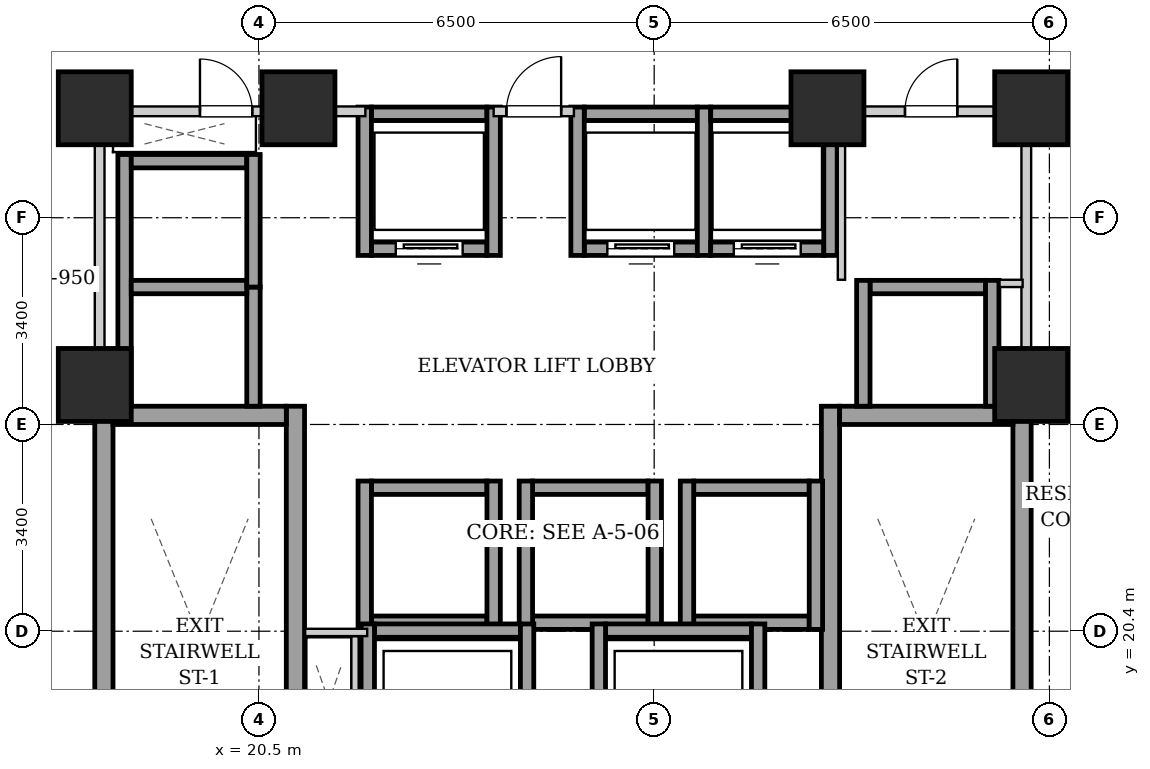
"""IFC4 building model, lengths in metres.
Left out: names, types, materials, properties, quantities, classifications, styles, units other than length and angle.
Written with IfcOpenShell. Run it as: python <this file> out.ifc"""

import sys

from ifc_helpers import new_model, si_unit, direction, frame, frame_2d, origin, origin_2d, place, context, subcontext, project, spatial, rectangle, extrude, element, fill, save


model = new_model("IFC4")
c1 = context("Model", 3, precision=1e-05, world=origin(), true_north=direction((0.0, 1.0)))
c2 = subcontext(c1, "Body", "Model", "MODEL_VIEW")
j1 = project(units=[si_unit("LENGTHUNIT", "METRE"), si_unit("PLANEANGLEUNIT", "RADIAN")], contexts=[c1])
p1 = place(None, origin())
s1 = spatial("IfcSite", under=j1, at=p1, CompositionType="ELEMENT")
p2 = place(p1, origin())
s2 = spatial("IfcBuilding", under=s1, at=p2, CompositionType="ELEMENT")
p3 = place(p2, frame((0.0, 0.0, 45.0)))
s3 = spatial("IfcBuildingStorey", under=s2, at=p3, CompositionType="ELEMENT", Elevation=45.0)
for number, where, z_axis, x_axis in (
    (1, (17.8, 29.0, 0.0), (0.0, 0.0, 1.0), (1.0, 0.0, 0.0)),
    (2, (21.15, 29.0, 0.0), (0.0, 0.0, 1.0), (1.0, 0.0, 0.0)),
    (3, (29.85, 29.0, 0.0), (0.0, 0.0, 1.0), (1.0, 0.0, 0.0)),
    (4, (33.2, 29.0, 0.0), (0.0, 0.0, 1.0), (1.0, 0.0, 0.0)),
    (5, (17.8, 24.45, 0.0), (0.0, 0.0, 1.0), (1.0, 0.0, 0.0)),
    (6, (33.2, 24.45, 0.0), (0.0, 0.0, 1.0), (1.0, 0.0, 0.0)),
):
    element("IfcColumn", number, at=place(p3, frame(where, z_axis=z_axis, x_axis=x_axis)), inside=s3, PredefinedType="COLUMN", context=c2, shape_type="SweptSolid", body=[
        extrude(rectangle(XDim=1.2, YDim=1.2, at=origin_2d()), origin(), (0.0, 0.0, 1.0), 3.2),
    ])
for number, where, z_axis, x_axis in (
    (7, (17.95, 15.1, 0.0), (0.0, 0.0, 1.0), (0.0, 1.0, 0.0)),
    (8, (21.1, 15.1, 0.0), (0.0, 0.0, 1.0), (0.0, 1.0, 0.0)),
):
    element("IfcWall", number, at=place(p3, frame(where, z_axis=z_axis, x_axis=x_axis)), inside=s3, PredefinedType="SHEAR", context=c2, shape_type="SweptSolid", body=[
        extrude(rectangle(XDim=9.0, YDim=0.3, at=frame_2d((4.5, 0.0))), origin(), (0.0, 0.0, 1.0), 2.94),
    ])
p4 = place(p3, frame((18.1, 23.95, 0.0), z_axis=(0.0, 0.0, 1.0), x_axis=(1.0, 0.0, 0.0)))
e9 = element("IfcWall", 9, at=p4, inside=s3, PredefinedType="SHEAR", context=c2, shape_type="SweptSolid", body=[
    extrude(rectangle(XDim=2.85, YDim=0.3, at=frame_2d((1.425, 0.0))), origin(), (0.0, 0.0, 1.0), 2.94),
])
for number, where, z_axis, x_axis in (
    (10, (29.9, 15.1, 0.0), (0.0, 0.0, 1.0), (0.0, 1.0, 0.0)),
    (11, (33.05, 15.1, 0.0), (0.0, 0.0, 1.0), (0.0, 1.0, 0.0)),
):
    element("IfcWall", number, at=place(p3, frame(where, z_axis=z_axis, x_axis=x_axis)), inside=s3, PredefinedType="SHEAR", context=c2, shape_type="SweptSolid", body=[
        extrude(rectangle(XDim=9.0, YDim=0.3, at=frame_2d((4.5, 0.0))), origin(), (0.0, 0.0, 1.0), 2.94),
    ])
p5 = place(p3, frame((30.05, 23.95, 0.0), z_axis=(0.0, 0.0, 1.0), x_axis=(1.0, 0.0, 0.0)))
e12 = element("IfcWall", 12, at=p5, inside=s3, PredefinedType="SHEAR", context=c2, shape_type="SweptSolid", body=[
    extrude(rectangle(XDim=2.85, YDim=0.3, at=frame_2d((1.425, 0.0))), origin(), (0.0, 0.0, 1.0), 2.94),
])
p6 = place(p3, frame((22.35, 26.69, 0.0), z_axis=(0.0, 0.0, 1.0), x_axis=(1.0, 0.0, 0.0)))
e13 = element("IfcWall", 13, at=p6, inside=s3, PredefinedType="SHEAR", context=c2, shape_type="SweptSolid", body=[
    extrude(rectangle(XDim=1.9, YDim=0.22, at=frame_2d((0.95, 0.0))), origin(), (0.0, 0.0, 1.0), 2.94),
])
p7 = place(p6, frame((0.4, 0.0, 0.0)))
e14 = element("IfcOpeningElement", 14, at=p7, cuts=e13, PredefinedType="OPENING", context=c2, shape_type="SweptSolid", body=[
    extrude(rectangle(XDim=1.1, YDim=2.15, at=frame_2d((0.55, 1.075))), frame((0.0, 0.12, 0.0), z_axis=(0.0, -1.0, 0.0), x_axis=(1.0, 0.0, 0.0)), (0.0, 0.0, 1.0), 0.24),
])
p8 = place(p3, frame((22.35, 28.91, 0.0), z_axis=(0.0, 0.0, 1.0), x_axis=(1.0, 0.0, 0.0)))
e15 = element("IfcWall", 15, at=p8, inside=s3, PredefinedType="SHEAR", context=c2, shape_type="SweptSolid", body=[
    extrude(rectangle(XDim=1.9, YDim=0.22, at=frame_2d((0.95, 0.0))), origin(), (0.0, 0.0, 1.0), 2.94),
])
for number, where, z_axis, x_axis in (
    (16, (22.24, 26.58, 0.0), (0.0, 0.0, 1.0), (0.0, 1.0, 0.0)),
    (17, (24.36, 26.58, 0.0), (0.0, 0.0, 1.0), (0.0, 1.0, 0.0)),
):
    element("IfcWall", number, at=place(p3, frame(where, z_axis=z_axis, x_axis=x_axis)), inside=s3, PredefinedType="SHEAR", context=c2, shape_type="SweptSolid", body=[
        extrude(rectangle(XDim=2.44, YDim=0.22, at=frame_2d((1.22, 0.0))), origin(), (0.0, 0.0, 1.0), 2.94),
    ])
p9 = place(p3, frame((25.85, 26.69, 0.0), z_axis=(0.0, 0.0, 1.0), x_axis=(1.0, 0.0, 0.0)))
e18 = element("IfcWall", 18, at=p9, inside=s3, PredefinedType="SHEAR", context=c2, shape_type="SweptSolid", body=[
    extrude(rectangle(XDim=1.86, YDim=0.22, at=frame_2d((0.93, 0.0))), origin(), (0.0, 0.0, 1.0), 2.94),
])
p10 = place(p9, frame((0.38, 0.0, 0.0)))
e19 = element("IfcOpeningElement", 19, at=p10, cuts=e18, PredefinedType="OPENING", context=c2, shape_type="SweptSolid", body=[
    extrude(rectangle(XDim=1.1, YDim=2.15, at=frame_2d((0.55, 1.075))), frame((0.0, 0.12, 0.0), z_axis=(0.0, -1.0, 0.0), x_axis=(1.0, 0.0, 0.0)), (0.0, 0.0, 1.0), 0.24),
])
p11 = place(p3, frame((25.85, 28.91, 0.0), z_axis=(0.0, 0.0, 1.0), x_axis=(1.0, 0.0, 0.0)))
e20 = element("IfcWall", 20, at=p11, inside=s3, PredefinedType="SHEAR", context=c2, shape_type="SweptSolid", body=[
    extrude(rectangle(XDim=1.86, YDim=0.22, at=frame_2d((0.93, 0.0))), origin(), (0.0, 0.0, 1.0), 2.94),
])
for number, where, z_axis, x_axis in (
    (21, (25.74, 26.58, 0.0), (0.0, 0.0, 1.0), (0.0, 1.0, 0.0)),
    (22, (27.82, 26.58, 0.0), (0.0, 0.0, 1.0), (0.0, 1.0, 0.0)),
):
    element("IfcWall", number, at=place(p3, frame(where, z_axis=z_axis, x_axis=x_axis)), inside=s3, PredefinedType="SHEAR", context=c2, shape_type="SweptSolid", body=[
        extrude(rectangle(XDim=2.44, YDim=0.22, at=frame_2d((1.22, 0.0))), origin(), (0.0, 0.0, 1.0), 2.94),
    ])
p12 = place(p3, frame((27.93, 26.69, 0.0), z_axis=(0.0, 0.0, 1.0), x_axis=(1.0, 0.0, 0.0)))
e23 = element("IfcWall", 23, at=p12, inside=s3, PredefinedType="SHEAR", context=c2, shape_type="SweptSolid", body=[
    extrude(rectangle(XDim=1.86, YDim=0.22, at=frame_2d((0.93, 0.0))), origin(), (0.0, 0.0, 1.0), 2.94),
])
p13 = place(p12, frame((0.38, 0.0, 0.0)))
e24 = element("IfcOpeningElement", 24, at=p13, cuts=e23, PredefinedType="OPENING", context=c2, shape_type="SweptSolid", body=[
    extrude(rectangle(XDim=1.1, YDim=2.15, at=frame_2d((0.55, 1.075))), frame((0.0, 0.12, 0.0), z_axis=(0.0, -1.0, 0.0), x_axis=(1.0, 0.0, 0.0)), (0.0, 0.0, 1.0), 0.24),
])
p14 = place(p3, frame((27.93, 28.91, 0.0), z_axis=(0.0, 0.0, 1.0), x_axis=(1.0, 0.0, 0.0)))
e25 = element("IfcWall", 25, at=p14, inside=s3, PredefinedType="SHEAR", context=c2, shape_type="SweptSolid", body=[
    extrude(rectangle(XDim=1.86, YDim=0.22, at=frame_2d((0.93, 0.0))), origin(), (0.0, 0.0, 1.0), 2.94),
])
p15 = place(p3, frame((29.9, 26.58, 0.0), z_axis=(0.0, 0.0, 1.0), x_axis=(0.0, 1.0, 0.0)))
e26 = element("IfcWall", 26, at=p15, inside=s3, PredefinedType="SHEAR", context=c2, shape_type="SweptSolid", body=[
    extrude(rectangle(XDim=2.44, YDim=0.22, at=frame_2d((1.22, 0.0))), origin(), (0.0, 0.0, 1.0), 2.94),
])
for number, where, z_axis, x_axis in (
    (27, (22.35, 20.54, 0.0), (0.0, 0.0, 1.0), (1.0, 0.0, 0.0)),
    (28, (22.35, 22.76, 0.0), (0.0, 0.0, 1.0), (1.0, 0.0, 0.0)),
):
    element("IfcWall", number, at=place(p3, frame(where, z_axis=z_axis, x_axis=x_axis)), inside=s3, PredefinedType="SHEAR", context=c2, shape_type="SweptSolid", body=[
        extrude(rectangle(XDim=1.9, YDim=0.22, at=frame_2d((0.95, 0.0))), origin(), (0.0, 0.0, 1.0), 2.94),
    ])
for number, where, z_axis, x_axis in (
    (29, (22.24, 20.43, 0.0), (0.0, 0.0, 1.0), (0.0, 1.0, 0.0)),
    (30, (24.36, 20.43, 0.0), (0.0, 0.0, 1.0), (0.0, 1.0, 0.0)),
):
    element("IfcWall", number, at=place(p3, frame(where, z_axis=z_axis, x_axis=x_axis)), inside=s3, PredefinedType="SHEAR", context=c2, shape_type="SweptSolid", body=[
        extrude(rectangle(XDim=2.44, YDim=0.22, at=frame_2d((1.22, 0.0))), origin(), (0.0, 0.0, 1.0), 2.94),
    ])
for number, where, z_axis, x_axis in (
    (31, (25.0, 20.54, 0.0), (0.0, 0.0, 1.0), (1.0, 0.0, 0.0)),
    (32, (25.0, 22.76, 0.0), (0.0, 0.0, 1.0), (1.0, 0.0, 0.0)),
):
    element("IfcWall", number, at=place(p3, frame(where, z_axis=z_axis, x_axis=x_axis)), inside=s3, PredefinedType="SHEAR", context=c2, shape_type="SweptSolid", body=[
        extrude(rectangle(XDim=1.9, YDim=0.22, at=frame_2d((0.95, 0.0))), origin(), (0.0, 0.0, 1.0), 2.94),
    ])
for number, where, z_axis, x_axis in (
    (33, (24.89, 20.43, 0.0), (0.0, 0.0, 1.0), (0.0, 1.0, 0.0)),
    (34, (27.01, 20.43, 0.0), (0.0, 0.0, 1.0), (0.0, 1.0, 0.0)),
):
    element("IfcWall", number, at=place(p3, frame(where, z_axis=z_axis, x_axis=x_axis)), inside=s3, PredefinedType="SHEAR", context=c2, shape_type="SweptSolid", body=[
        extrude(rectangle(XDim=2.44, YDim=0.22, at=frame_2d((1.22, 0.0))), origin(), (0.0, 0.0, 1.0), 2.94),
    ])
for number, where, z_axis, x_axis in (
    (35, (27.65, 20.54, 0.0), (0.0, 0.0, 1.0), (1.0, 0.0, 0.0)),
    (36, (27.65, 22.76, 0.0), (0.0, 0.0, 1.0), (1.0, 0.0, 0.0)),
):
    element("IfcWall", number, at=place(p3, frame(where, z_axis=z_axis, x_axis=x_axis)), inside=s3, PredefinedType="SHEAR", context=c2, shape_type="SweptSolid", body=[
        extrude(rectangle(XDim=1.9, YDim=0.22, at=frame_2d((0.95, 0.0))), origin(), (0.0, 0.0, 1.0), 2.94),
    ])
for number, where, z_axis, x_axis in (
    (37, (27.54, 20.43, 0.0), (0.0, 0.0, 1.0), (0.0, 1.0, 0.0)),
    (38, (29.66, 20.43, 0.0), (0.0, 0.0, 1.0), (0.0, 1.0, 0.0)),
):
    element("IfcWall", number, at=place(p3, frame(where, z_axis=z_axis, x_axis=x_axis)), inside=s3, PredefinedType="SHEAR", context=c2, shape_type="SweptSolid", body=[
        extrude(rectangle(XDim=2.44, YDim=0.22, at=frame_2d((1.22, 0.0))), origin(), (0.0, 0.0, 1.0), 2.94),
    ])
p16 = place(p3, frame((18.29, 24.1, 0.0), z_axis=(0.0, 0.0, 1.0), x_axis=(0.0, 1.0, 0.0)))
e39 = element("IfcWall", 39, at=p16, inside=s3, PredefinedType="SHEAR", context=c2, shape_type="SweptSolid", body=[
    extrude(rectangle(XDim=4.14, YDim=0.22, at=frame_2d((2.07, 0.0))), origin(), (0.0, 0.0, 1.0), 2.94),
])
p17 = place(p3, frame((20.41, 24.1, 0.0), z_axis=(0.0, 0.0, 1.0), x_axis=(0.0, 1.0, 0.0)))
e40 = element("IfcWall", 40, at=p17, inside=s3, PredefinedType="SHEAR", context=c2, shape_type="SweptSolid", body=[
    extrude(rectangle(XDim=1.96, YDim=0.22, at=frame_2d((0.98, 0.0))), origin(), (0.0, 0.0, 1.0), 2.94),
])
for number, where, z_axis, x_axis in (
    (41, (18.4, 26.06, 0.0), (0.0, 0.0, 1.0), (1.0, 0.0, 0.0)),
    (42, (18.4, 28.13, 0.0), (0.0, 0.0, 1.0), (1.0, 0.0, 0.0)),
):
    element("IfcWall", number, at=place(p3, frame(where, z_axis=z_axis, x_axis=x_axis)), inside=s3, PredefinedType="SHEAR", context=c2, shape_type="SweptSolid", body=[
        extrude(rectangle(XDim=1.9, YDim=0.22, at=frame_2d((0.95, 0.0))), origin(), (0.0, 0.0, 1.0), 2.94),
    ])
p18 = place(p3, frame((20.41, 26.06, 0.0), z_axis=(0.0, 0.0, 1.0), x_axis=(0.0, 1.0, 0.0)))
e43 = element("IfcWall", 43, at=p18, inside=s3, PredefinedType="SHEAR", context=c2, shape_type="SweptSolid", body=[
    extrude(rectangle(XDim=2.18, YDim=0.22, at=frame_2d((1.09, 0.0))), origin(), (0.0, 0.0, 1.0), 2.94),
])
p19 = place(p3, frame((30.55, 26.06, 0.0), z_axis=(0.0, 0.0, 1.0), x_axis=(1.0, 0.0, 0.0)))
e44 = element("IfcWall", 44, at=p19, inside=s3, PredefinedType="SHEAR", context=c2, shape_type="SweptSolid", body=[
    extrude(rectangle(XDim=1.9, YDim=0.22, at=frame_2d((0.95, 0.0))), origin(), (0.0, 0.0, 1.0), 2.94),
])
for number, where, z_axis, x_axis in (
    (45, (30.44, 24.1, 0.0), (0.0, 0.0, 1.0), (0.0, 1.0, 0.0)),
    (46, (32.56, 24.1, 0.0), (0.0, 0.0, 1.0), (0.0, 1.0, 0.0)),
):
    element("IfcWall", number, at=place(p3, frame(where, z_axis=z_axis, x_axis=x_axis)), inside=s3, PredefinedType="SHEAR", context=c2, shape_type="SweptSolid", body=[
        extrude(rectangle(XDim=2.07, YDim=0.22, at=frame_2d((1.035, 0.0))), origin(), (0.0, 0.0, 1.0), 2.94),
    ])
p20 = place(p3, frame((22.4, 20.41, 0.0), z_axis=(0.0, 0.0, 1.0), x_axis=(1.0, 0.0, 0.0)))
e47 = element("IfcWall", 47, at=p20, inside=s3, PredefinedType="SHEAR", context=c2, shape_type="SweptSolid", body=[
    extrude(rectangle(XDim=2.4, YDim=0.22, at=frame_2d((1.2, 0.0))), origin(), (0.0, 0.0, 1.0), 2.94),
])
for number, where, z_axis, x_axis in (
    (48, (22.29, 17.98, 0.0), (0.0, 0.0, 1.0), (0.0, 1.0, 0.0)),
    (49, (24.91, 17.98, 0.0), (0.0, 0.0, 1.0), (0.0, 1.0, 0.0)),
):
    element("IfcWall", number, at=place(p3, frame(where, z_axis=z_axis, x_axis=x_axis)), inside=s3, PredefinedType="SHEAR", context=c2, shape_type="SweptSolid", body=[
        extrude(rectangle(XDim=2.54, YDim=0.22, at=frame_2d((1.27, 0.0))), origin(), (0.0, 0.0, 1.0), 2.94),
    ])
p21 = place(p3, frame((26.2, 20.41, 0.0), z_axis=(0.0, 0.0, 1.0), x_axis=(1.0, 0.0, 0.0)))
e50 = element("IfcWall", 50, at=p21, inside=s3, PredefinedType="SHEAR", context=c2, shape_type="SweptSolid", body=[
    extrude(rectangle(XDim=2.4, YDim=0.22, at=frame_2d((1.2, 0.0))), origin(), (0.0, 0.0, 1.0), 2.94),
])
for number, where, z_axis, x_axis in (
    (51, (26.09, 17.98, 0.0), (0.0, 0.0, 1.0), (0.0, 1.0, 0.0)),
    (52, (28.71, 17.98, 0.0), (0.0, 0.0, 1.0), (0.0, 1.0, 0.0)),
):
    element("IfcWall", number, at=place(p3, frame(where, z_axis=z_axis, x_axis=x_axis)), inside=s3, PredefinedType="SHEAR", context=c2, shape_type="SweptSolid", body=[
        extrude(rectangle(XDim=2.54, YDim=0.22, at=frame_2d((1.27, 0.0))), origin(), (0.0, 0.0, 1.0), 2.94),
    ])
for number, where, z_axis, x_axis in (
    (53, (17.88, 24.12, 0.0), (0.0, 0.0, 1.0), (0.0, 1.0, 0.0)),
    (54, (33.12, 24.12, 0.0), (0.0, 0.0, 1.0), (0.0, 1.0, 0.0)),
):
    element("IfcWall", number, at=place(p3, frame(where, z_axis=z_axis, x_axis=x_axis)), inside=s3, PredefinedType="PARTITIONING", context=c2, shape_type="SweptSolid", body=[
        extrude(rectangle(XDim=4.76, YDim=0.16, at=frame_2d((2.38, 0.0))), origin(), (0.0, 0.0, 1.0), 2.94),
    ])
p22 = place(p3, frame((24.36, 28.95, 0.0), z_axis=(0.0, 0.0, 1.0), x_axis=(1.0, 0.0, 0.0)))
e55 = element("IfcWall", 55, at=p22, inside=s3, PredefinedType="PARTITIONING", context=c2, shape_type="SweptSolid", body=[
    extrude(rectangle(XDim=1.32, YDim=0.16, at=frame_2d((0.66, 0.0))), origin(), (0.0, 0.0, 1.0), 2.155),
])
p23 = place(p22, frame((0.21, 0.0, 0.0)))
e56 = element("IfcOpeningElement", 56, at=p23, cuts=e55, PredefinedType="OPENING", context=c2, shape_type="SweptSolid", body=[
    extrude(rectangle(XDim=0.9, YDim=2.05, at=frame_2d((0.45, 1.025))), frame((0.0, 0.09, 0.0), z_axis=(0.0, -1.0, 0.0), x_axis=(1.0, 0.0, 0.0)), (0.0, 0.0, 1.0), 0.18),
])
p24 = place(p3, frame((17.96, 28.95, 0.0), z_axis=(0.0, 0.0, 1.0), x_axis=(1.0, 0.0, 0.0)))
e57 = element("IfcWall", 57, at=p24, inside=s3, PredefinedType="PARTITIONING", context=c2, shape_type="SweptSolid", body=[
    extrude(rectangle(XDim=4.29, YDim=0.16, at=frame_2d((2.145, 0.0))), origin(), (0.0, 0.0, 1.0), 2.155),
])
p25 = place(p24, frame((1.57, 0.0, 0.0)))
e58 = element("IfcOpeningElement", 58, at=p25, cuts=e57, PredefinedType="OPENING", context=c2, shape_type="SweptSolid", body=[
    extrude(rectangle(XDim=0.86, YDim=2.05, at=frame_2d((0.43, 1.025))), frame((0.0, 0.09, 0.0), z_axis=(0.0, -1.0, 0.0), x_axis=(1.0, 0.0, 0.0)), (0.0, 0.0, 1.0), 0.18),
])
p26 = place(p3, frame((22.08, 18.2, 0.0), z_axis=(0.0, 0.0, 1.0), x_axis=(0.0, 1.0, 0.0)))
e59 = element("IfcWall", 59, at=p26, inside=s3, PredefinedType="PARTITIONING", context=c2, shape_type="SweptSolid", body=[
    extrude(rectangle(XDim=2.12, YDim=0.12, at=frame_2d((1.06, 0.0))), origin(), (0.0, 0.0, 1.0), 2.94),
])
p27 = place(p3, frame((22.28, 20.38, 0.0), z_axis=(0.0, 0.0, 1.0), x_axis=(-1.0, 0.0, 0.0)))
e60 = element("IfcWall", 60, at=p27, inside=s3, PredefinedType="PARTITIONING", context=c2, shape_type="SweptSolid", body=[
    extrude(rectangle(XDim=1.02, YDim=0.12, at=frame_2d((0.51, 0.0))), origin(), (0.0, 0.0, 1.0), 2.94),
])
p28 = place(p3, frame((30.08, 26.18, 0.0), z_axis=(0.0, 0.0, 1.0), x_axis=(0.0, 1.0, 0.0)))
e61 = element("IfcWall", 61, at=p28, inside=s3, PredefinedType="PARTITIONING", context=c2, shape_type="SweptSolid", body=[
    extrude(rectangle(XDim=2.68, YDim=0.12, at=frame_2d((1.34, 0.0))), origin(), (0.0, 0.0, 1.0), 2.94),
])
p29 = place(p3, frame((32.68, 26.12, 0.0), z_axis=(0.0, 0.0, 1.0), x_axis=(1.0, 0.0, 0.0)))
e62 = element("IfcWall", 62, at=p29, inside=s3, PredefinedType="PARTITIONING", context=c2, shape_type="SweptSolid", body=[
    extrude(rectangle(XDim=0.38, YDim=0.12, at=frame_2d((0.19, 0.0))), origin(), (0.0, 0.0, 1.0), 2.94),
])
p30 = place(p3, frame((30.08, 28.95, 0.0), z_axis=(0.0, 0.0, 1.0), x_axis=(1.0, 0.0, 0.0)))
e63 = element("IfcWall", 63, at=p30, inside=s3, PredefinedType="PARTITIONING", context=c2, shape_type="SweptSolid", body=[
    extrude(rectangle(XDim=2.96, YDim=0.16, at=frame_2d((1.48, 0.0))), origin(), (0.0, 0.0, 1.0), 2.94),
])
p31 = place(p30, frame((1.045, 0.0, 0.0)))
e64 = element("IfcOpeningElement", 64, at=p31, cuts=e63, PredefinedType="OPENING", context=c2, shape_type="SweptSolid", body=[
    extrude(rectangle(XDim=0.86, YDim=2.05, at=frame_2d((0.43, 1.025))), frame((0.0, 0.09, 0.0), z_axis=(0.0, -1.0, 0.0), x_axis=(1.0, 0.0, 0.0)), (0.0, 0.0, 1.0), 0.18),
])
p32 = place(p7, origin())
e65 = element("IfcDoor", 65, at=p32, inside=s3, OperationType="SLIDING_TO_LEFT", PredefinedType="DOOR", context=c2, shape_type="SweptSolid", body=[
    extrude(rectangle(XDim=1.1, YDim=2.15, at=frame_2d((0.55, 1.075))), frame((0.0, 0.025, 0.0), z_axis=(0.0, -1.0, 0.0), x_axis=(1.0, 0.0, 0.0)), (0.0, 0.0, 1.0), 0.05),
])
fill(e14, e65)
p33 = place(p10, origin())
e66 = element("IfcDoor", 66, at=p33, inside=s3, OperationType="SLIDING_TO_LEFT", PredefinedType="DOOR", context=c2, shape_type="SweptSolid", body=[
    extrude(rectangle(XDim=1.1, YDim=2.15, at=frame_2d((0.55, 1.075))), frame((0.0, 0.025, 0.0), z_axis=(0.0, -1.0, 0.0), x_axis=(1.0, 0.0, 0.0)), (0.0, 0.0, 1.0), 0.05),
])
fill(e19, e66)
p34 = place(p13, origin())
e67 = element("IfcDoor", 67, at=p34, inside=s3, OperationType="SLIDING_TO_LEFT", PredefinedType="DOOR", context=c2, shape_type="SweptSolid", body=[
    extrude(rectangle(XDim=1.1, YDim=2.15, at=frame_2d((0.55, 1.075))), frame((0.0, 0.025, 0.0), z_axis=(0.0, -1.0, 0.0), x_axis=(1.0, 0.0, 0.0)), (0.0, 0.0, 1.0), 0.05),
])
fill(e24, e67)
p35 = place(p23, origin())
e68 = element("IfcDoor", 68, at=p35, inside=s3, OperationType="SINGLE_SWING_RIGHT", PredefinedType="DOOR", context=c2, shape_type="SweptSolid", body=[
    extrude(rectangle(XDim=0.9, YDim=2.05, at=frame_2d((0.45, 1.025))), frame((0.0, 0.025, 0.0), z_axis=(0.0, -1.0, 0.0), x_axis=(1.0, 0.0, 0.0)), (0.0, 0.0, 1.0), 0.05),
])
fill(e56, e68)
p36 = place(p25, origin())
e69 = element("IfcDoor", 69, at=p36, inside=s3, OperationType="SINGLE_SWING_LEFT", PredefinedType="DOOR", context=c2, shape_type="SweptSolid", body=[
    extrude(rectangle(XDim=0.86, YDim=2.05, at=frame_2d((0.43, 1.025))), frame((0.0, 0.025, 0.0), z_axis=(0.0, -1.0, 0.0), x_axis=(1.0, 0.0, 0.0)), (0.0, 0.0, 1.0), 0.05),
])
fill(e58, e69)
p37 = place(p31, origin())
e70 = element("IfcDoor", 70, at=p37, inside=s3, OperationType="SINGLE_SWING_RIGHT", PredefinedType="DOOR", context=c2, shape_type="SweptSolid", body=[
    extrude(rectangle(XDim=0.86, YDim=2.05, at=frame_2d((0.43, 1.025))), frame((0.0, 0.025, 0.0), z_axis=(0.0, -1.0, 0.0), x_axis=(1.0, 0.0, 0.0)), (0.0, 0.0, 1.0), 0.05),
])
fill(e64, e70)
save(model, sys.argv[1])
